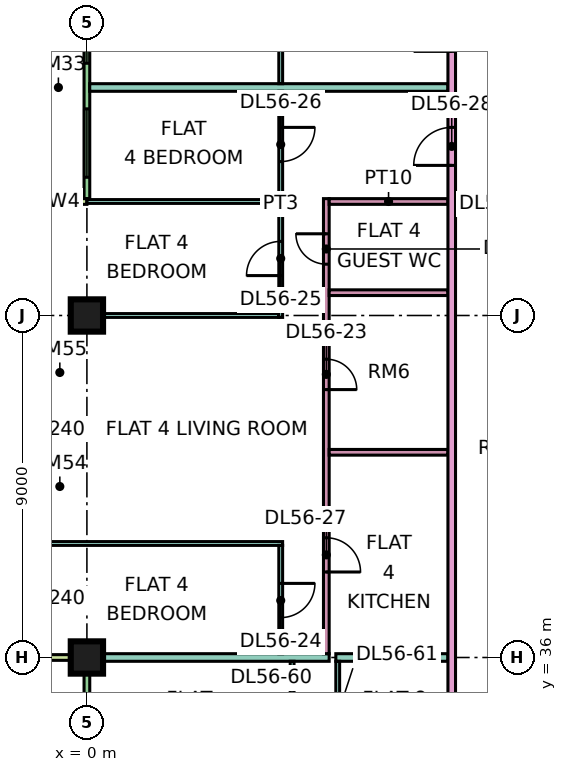
"""IFC4 building model, lengths in metres.
Left out: names, types, materials, properties, quantities, classifications, styles, units other than length and angle.
Written with IfcOpenShell. Run it as: python <this file> out.ifc"""

import sys

from ifc_helpers import new_model, si_unit, direction, frame, frame_2d, origin, origin_2d, place, context, subcontext, project, spatial, rectangle, extrude, element, fill, save


model = new_model("IFC4")
c1 = context("Model", 3, precision=1e-05, world=origin(), true_north=direction((0.0, 1.0)))
c2 = subcontext(c1, "Body", "Model", "MODEL_VIEW")
j1 = project(units=[si_unit("LENGTHUNIT", "METRE"), si_unit("PLANEANGLEUNIT", "RADIAN")], contexts=[c1])
p1 = place(None, origin())
s1 = spatial("IfcSite", under=j1, at=p1, CompositionType="ELEMENT")
p2 = place(p1, origin())
s2 = spatial("IfcBuilding", under=s1, at=p2, CompositionType="ELEMENT")
p3 = place(p2, frame((0.0, 0.0, 237.9)))
s3 = spatial("IfcBuildingStorey", under=s2, at=p3, CompositionType="ELEMENT", Elevation=237.9)
p4 = place(p3, frame((0.0, 36.0, 0.0), z_axis=(0.0, 0.0, 1.0), x_axis=(1.0, 0.0, 0.0)))
e1 = element("IfcColumn", 1, at=p4, inside=s3, PredefinedType="COLUMN", context=c2, shape_type="SweptSolid", body=[
    extrude(rectangle(XDim=0.85, YDim=0.85, at=origin_2d()), origin(), (0.0, 0.0, 1.0), 3.75),
])
p5 = place(p3, frame((0.0, 45.0, 0.0), z_axis=(0.0, 0.0, 1.0), x_axis=(1.0, 0.0, 0.0)))
e2 = element("IfcColumn", 2, at=p5, inside=s3, PredefinedType="COLUMN", context=c2, shape_type="SweptSolid", body=[
    extrude(rectangle(XDim=0.85, YDim=0.85, at=origin_2d()), origin(), (0.0, 0.0, 1.0), 3.75),
])
p6 = place(p3, frame((0.0, 61.425, 0.0), z_axis=(0.0, 0.0, 1.0), x_axis=(0.0, -1.0, 0.0)))
e3 = element("IfcWall", 3, at=p6, inside=s3, PredefinedType="SOLIDWALL", context=c2, shape_type="SweptSolid", body=[
    extrude(rectangle(XDim=13.35, YDim=0.15, at=frame_2d((6.675, 0.0))), origin(), (0.0, 0.0, 1.0), 3.35),
])
p7 = place(p6, frame((1.312, 0.0, 0.0)))
e4 = element("IfcOpeningElement", 4, at=p7, cuts=e3, PredefinedType="OPENING", context=c2, shape_type="SweptSolid", body=[
    extrude(rectangle(XDim=1.8, YDim=2.4, at=frame_2d((0.9, 1.2))), frame((0.0, 0.085, 0.0), z_axis=(0.0, -1.0, 0.0), x_axis=(1.0, 0.0, 0.0)), (0.0, 0.0, 1.0), 0.17),
])
p8 = place(p6, frame((5.062, 0.0, 0.45)))
e5 = element("IfcOpeningElement", 5, at=p8, cuts=e3, PredefinedType="OPENING", context=c2, shape_type="SweptSolid", body=[
    extrude(rectangle(XDim=1.2, YDim=2.4, at=frame_2d((0.6, 1.2))), frame((0.0, 0.085, 0.0), z_axis=(0.0, -1.0, 0.0), x_axis=(1.0, 0.0, 0.0)), (0.0, 0.0, 1.0), 0.17),
])
p9 = place(p6, frame((8.587, 0.0, 0.45)))
e6 = element("IfcOpeningElement", 6, at=p9, cuts=e3, PredefinedType="OPENING", context=c2, shape_type="SweptSolid", body=[
    extrude(rectangle(XDim=1.2, YDim=2.4, at=frame_2d((0.6, 1.2))), frame((0.0, 0.085, 0.0), z_axis=(0.0, -1.0, 0.0), x_axis=(1.0, 0.0, 0.0)), (0.0, 0.0, 1.0), 0.17),
])
p10 = place(p6, frame((10.988, 0.0, 0.45)))
e7 = element("IfcOpeningElement", 7, at=p10, cuts=e3, PredefinedType="OPENING", context=c2, shape_type="SweptSolid", body=[
    extrude(rectangle(XDim=1.8, YDim=2.4, at=frame_2d((0.9, 1.2))), frame((0.0, 0.085, 0.0), z_axis=(0.0, -1.0, 0.0), x_axis=(1.0, 0.0, 0.0)), (0.0, 0.0, 1.0), 0.17),
])
p11 = place(p3, frame((-1.5, 48.0, 0.0), z_axis=(0.0, 0.0, 1.0), x_axis=(1.0, 0.0, 0.0)))
e8 = element("IfcWall", 8, at=p11, inside=s3, PredefinedType="SOLIDWALL", context=c2, shape_type="SweptSolid", body=[
    extrude(rectangle(XDim=1.5, YDim=0.15, at=frame_2d((0.75, 0.0))), origin(), (0.0, 0.0, 1.0), 3.35),
])
p12 = place(p3, frame((0.0, 35.925, 0.0), z_axis=(0.0, 0.0, 1.0), x_axis=(0.0, -1.0, 0.0)))
e9 = element("IfcWall", 9, at=p12, inside=s3, PredefinedType="SOLIDWALL", context=c2, shape_type="SweptSolid", body=[
    extrude(rectangle(XDim=11.85, YDim=0.15, at=frame_2d((5.925, 0.0))), origin(), (0.0, 0.0, 1.0), 3.35),
])
p13 = place(p12, frame((1.087, 0.0, 0.0)))
e10 = element("IfcOpeningElement", 10, at=p13, cuts=e9, PredefinedType="OPENING", context=c2, shape_type="SweptSolid", body=[
    extrude(rectangle(XDim=1.2, YDim=2.4, at=frame_2d((0.6, 1.2))), frame((0.0, 0.085, 0.0), z_axis=(0.0, -1.0, 0.0), x_axis=(1.0, 0.0, 0.0)), (0.0, 0.0, 1.0), 0.17),
])
p14 = place(p12, frame((3.525, 0.0, 0.45)))
e11 = element("IfcOpeningElement", 11, at=p14, cuts=e9, PredefinedType="OPENING", context=c2, shape_type="SweptSolid", body=[
    extrude(rectangle(XDim=1.8, YDim=2.4, at=frame_2d((0.9, 1.2))), frame((0.0, 0.085, 0.0), z_axis=(0.0, -1.0, 0.0), x_axis=(1.0, 0.0, 0.0)), (0.0, 0.0, 1.0), 0.17),
])
p15 = place(p12, frame((7.163, 0.0, 0.45)))
e12 = element("IfcOpeningElement", 12, at=p15, cuts=e9, PredefinedType="OPENING", context=c2, shape_type="SweptSolid", body=[
    extrude(rectangle(XDim=3.0, YDim=2.4, at=frame_2d((1.5, 1.2))), frame((0.0, 0.085, 0.0), z_axis=(0.0, -1.0, 0.0), x_axis=(1.0, 0.0, 0.0)), (0.0, 0.0, 1.0), 0.17),
])
p16 = place(p3, frame((-1.5, 36.0, 0.0), z_axis=(0.0, 0.0, 1.0), x_axis=(1.0, 0.0, 0.0)))
e13 = element("IfcWall", 13, at=p16, inside=s3, PredefinedType="SOLIDWALL", context=c2, shape_type="SweptSolid", body=[
    extrude(rectangle(XDim=1.5, YDim=0.15, at=frame_2d((0.75, 0.0))), origin(), (0.0, 0.0, 1.0), 3.35),
])
e14 = element("IfcWall", 14, at=p4, inside=s3, PredefinedType="PARTITIONING", context=c2, shape_type="SweptSolid", body=[
    extrude(rectangle(XDim=6.375, YDim=0.2, at=frame_2d((3.188, 0.0))), origin(), (0.0, 0.0, 1.0), 3.35),
])
p17 = place(p3, frame((-1.35, 39.0, 0.0), z_axis=(0.0, 0.0, 1.0), x_axis=(1.0, 0.0, 0.0)))
e15 = element("IfcWall", 15, at=p17, inside=s3, PredefinedType="PARTITIONING", context=c2, shape_type="SweptSolid", body=[
    extrude(rectangle(XDim=6.5, YDim=0.1, at=frame_2d((3.25, 0.0))), origin(), (0.0, 0.0, 1.0), 3.35),
])
e16 = element("IfcWall", 16, at=p5, inside=s3, PredefinedType="PARTITIONING", context=c2, shape_type="SweptSolid", body=[
    extrude(rectangle(XDim=5.05, YDim=0.1, at=frame_2d((2.525, 0.0))), origin(), (0.0, 0.0, 1.0), 3.35),
])
p18 = place(p3, frame((0.0, 48.0, 0.0), z_axis=(0.0, 0.0, 1.0), x_axis=(1.0, 0.0, 0.0)))
e17 = element("IfcWall", 17, at=p18, inside=s3, PredefinedType="PARTITIONING", context=c2, shape_type="SweptSolid", body=[
    extrude(rectangle(XDim=5.05, YDim=0.1, at=frame_2d((2.525, 0.0))), origin(), (0.0, 0.0, 1.0), 3.35),
])
p19 = place(p3, frame((0.074, 51.0, 0.0), z_axis=(0.0, 0.0, 1.0), x_axis=(1.0, 0.0, 0.0)))
e18 = element("IfcWall", 18, at=p19, inside=s3, PredefinedType="PARTITIONING", context=c2, shape_type="SweptSolid", body=[
    extrude(rectangle(XDim=9.426, YDim=0.2, at=frame_2d((4.713, 0.0))), origin(), (0.0, 0.0, 1.0), 3.35),
])
p20 = place(p3, frame((5.1, 36.1, 0.0), z_axis=(0.0, 0.0, 1.0), x_axis=(0.0, 1.0, 0.0)))
e19 = element("IfcWall", 19, at=p20, inside=s3, PredefinedType="PARTITIONING", context=c2, shape_type="SweptSolid", body=[
    extrude(rectangle(XDim=2.85, YDim=0.1, at=frame_2d((1.425, 0.0))), origin(), (0.0, 0.0, 1.0), 3.35),
])
p21 = place(p20, frame((0.95, 0.0, 0.0)))
e20 = element("IfcOpeningElement", 20, at=p21, cuts=e19, PredefinedType="OPENING", context=c2, shape_type="SweptSolid", body=[
    extrude(rectangle(XDim=0.9, YDim=2.1, at=frame_2d((0.45, 1.05))), frame((0.0, 0.06, 0.0), z_axis=(0.0, -1.0, 0.0), x_axis=(1.0, 0.0, 0.0)), (0.0, 0.0, 1.0), 0.12),
])
p22 = place(p3, frame((5.1, 44.95, 0.0), z_axis=(0.0, 0.0, 1.0), x_axis=(0.0, 1.0, 0.0)))
e21 = element("IfcWall", 21, at=p22, inside=s3, PredefinedType="PARTITIONING", context=c2, shape_type="SweptSolid", body=[
    extrude(rectangle(XDim=5.95, YDim=0.1, at=frame_2d((2.975, 0.0))), origin(), (0.0, 0.0, 1.0), 3.35),
])
p23 = place(p22, frame((1.1, 0.0, 0.0)))
e22 = element("IfcOpeningElement", 22, at=p23, cuts=e21, PredefinedType="OPENING", context=c2, shape_type="SweptSolid", body=[
    extrude(rectangle(XDim=0.9, YDim=2.1, at=frame_2d((0.45, 1.05))), frame((0.0, 0.06, 0.0), z_axis=(0.0, -1.0, 0.0), x_axis=(1.0, 0.0, 0.0)), (0.0, 0.0, 1.0), 0.12),
])
p24 = place(p22, frame((4.1, 0.0, 0.0)))
e23 = element("IfcOpeningElement", 23, at=p24, cuts=e21, PredefinedType="OPENING", context=c2, shape_type="SweptSolid", body=[
    extrude(rectangle(XDim=0.9, YDim=2.1, at=frame_2d((0.45, 1.05))), frame((0.0, 0.06, 0.0), z_axis=(0.0, -1.0, 0.0), x_axis=(1.0, 0.0, 0.0)), (0.0, 0.0, 1.0), 0.12),
])
p25 = place(p3, frame((5.1, 51.1, 0.0), z_axis=(0.0, 0.0, 1.0), x_axis=(0.0, 1.0, 0.0)))
e24 = element("IfcWall", 24, at=p25, inside=s3, PredefinedType="PARTITIONING", context=c2, shape_type="SweptSolid", body=[
    extrude(rectangle(XDim=5.95, YDim=0.1, at=frame_2d((2.975, 0.0))), origin(), (0.0, 0.0, 1.0), 3.35),
])
p26 = place(p25, frame((0.95, 0.0, 0.0)))
e25 = element("IfcOpeningElement", 25, at=p26, cuts=e24, PredefinedType="OPENING", context=c2, shape_type="SweptSolid", body=[
    extrude(rectangle(XDim=0.9, YDim=2.1, at=frame_2d((0.45, 1.05))), frame((0.0, 0.06, 0.0), z_axis=(0.0, -1.0, 0.0), x_axis=(1.0, 0.0, 0.0)), (0.0, 0.0, 1.0), 0.12),
])
p27 = place(p25, frame((3.95, 0.0, 0.0)))
e26 = element("IfcOpeningElement", 26, at=p27, cuts=e24, PredefinedType="OPENING", context=c2, shape_type="SweptSolid", body=[
    extrude(rectangle(XDim=0.9, YDim=2.1, at=frame_2d((0.45, 1.05))), frame((0.0, 0.06, 0.0), z_axis=(0.0, -1.0, 0.0), x_axis=(1.0, 0.0, 0.0)), (0.0, 0.0, 1.0), 0.12),
])
p28 = place(p3, frame((5.4, 29.95, 0.0), z_axis=(0.0, 0.0, 1.0), x_axis=(0.0, 1.0, 0.0)))
e27 = element("IfcWall", 27, at=p28, inside=s3, PredefinedType="PARTITIONING", context=c2, shape_type="SweptSolid", body=[
    extrude(rectangle(XDim=5.95, YDim=0.1, at=frame_2d((2.975, 0.0))), origin(), (0.0, 0.0, 1.0), 3.35),
])
p29 = place(p28, frame((1.1, 0.0, 0.0)))
e28 = element("IfcOpeningElement", 28, at=p29, cuts=e27, PredefinedType="OPENING", context=c2, shape_type="SweptSolid", body=[
    extrude(rectangle(XDim=0.9, YDim=2.1, at=frame_2d((0.45, 1.05))), frame((0.0, 0.06, 0.0), z_axis=(0.0, -1.0, 0.0), x_axis=(1.0, 0.0, 0.0)), (0.0, 0.0, 1.0), 0.12),
])
p30 = place(p28, frame((4.1, 0.0, 0.0)))
e29 = element("IfcOpeningElement", 29, at=p30, cuts=e27, PredefinedType="OPENING", context=c2, shape_type="SweptSolid", body=[
    extrude(rectangle(XDim=0.9, YDim=2.1, at=frame_2d((0.45, 1.05))), frame((0.0, 0.06, 0.0), z_axis=(0.0, -1.0, 0.0), x_axis=(1.0, 0.0, 0.0)), (0.0, 0.0, 1.0), 0.12),
])
p31 = place(p3, frame((6.3, 36.1, 0.0), z_axis=(0.0, 0.0, 1.0), x_axis=(0.0, 1.0, 0.0)))
e30 = element("IfcWall", 30, at=p31, inside=s3, PredefinedType="PARTITIONING", context=c2, shape_type="SweptSolid", body=[
    extrude(rectangle(XDim=11.975, YDim=0.15, at=frame_2d((5.987, 0.0))), origin(), (0.0, 0.0, 1.0), 3.35),
])
p32 = place(p31, frame((6.95, 0.0, 0.0)))
e31 = element("IfcOpeningElement", 31, at=p32, cuts=e30, PredefinedType="OPENING", context=c2, shape_type="SweptSolid", body=[
    extrude(rectangle(XDim=0.8, YDim=2.1, at=frame_2d((0.4, 1.05))), frame((0.0, 0.085, 0.0), z_axis=(0.0, -1.0, 0.0), x_axis=(1.0, 0.0, 0.0)), (0.0, 0.0, 1.0), 0.17),
])
p33 = place(p31, frame((2.15, 0.0, 0.0)))
e32 = element("IfcOpeningElement", 32, at=p33, cuts=e30, PredefinedType="OPENING", context=c2, shape_type="SweptSolid", body=[
    extrude(rectangle(XDim=0.9, YDim=2.1, at=frame_2d((0.45, 1.05))), frame((0.0, 0.085, 0.0), z_axis=(0.0, -1.0, 0.0), x_axis=(1.0, 0.0, 0.0)), (0.0, 0.0, 1.0), 0.17),
])
p34 = place(p31, frame((10.25, 0.0, 0.0)))
e33 = element("IfcOpeningElement", 33, at=p34, cuts=e30, PredefinedType="OPENING", context=c2, shape_type="SweptSolid", body=[
    extrude(rectangle(XDim=0.8, YDim=2.1, at=frame_2d((0.4, 1.05))), frame((0.0, 0.085, 0.0), z_axis=(0.0, -1.0, 0.0), x_axis=(1.0, 0.0, 0.0)), (0.0, 0.0, 1.0), 0.17),
])
for number, where, z_axis, x_axis in (
    (34, (6.375, 41.4, 0.0), (0.0, 0.0, 1.0), (1.0, 0.0, 0.0)),
    (35, (6.375, 45.6, 0.0), (0.0, 0.0, 1.0), (1.0, 0.0, 0.0)),
    (36, (6.375, 48.0, 0.0), (0.0, 0.0, 1.0), (1.0, 0.0, 0.0)),
):
    element("IfcWall", number, at=place(p3, frame(where, z_axis=z_axis, x_axis=x_axis)), inside=s3, PredefinedType="PARTITIONING", context=c2, shape_type="SweptSolid", body=[
        extrude(rectangle(XDim=3.125, YDim=0.15, at=frame_2d((1.562, 0.0))), origin(), (0.0, 0.0, 1.0), 3.35),
    ])
p35 = place(p3, frame((6.55, 36.0, 0.0), z_axis=(0.0, 0.0, 1.0), x_axis=(1.0, 0.0, 0.0)))
e37 = element("IfcWall", 37, at=p35, inside=s3, PredefinedType="PARTITIONING", context=c2, shape_type="SweptSolid", body=[
    extrude(rectangle(XDim=2.95, YDim=0.2, at=frame_2d((1.475, 0.0))), origin(), (0.0, 0.0, 1.0), 3.35),
])
p36 = place(p3, frame((6.6, 32.95, 0.0), z_axis=(0.0, 0.0, 1.0), x_axis=(0.0, 1.0, 0.0)))
e38 = element("IfcWall", 38, at=p36, inside=s3, PredefinedType="PARTITIONING", context=c2, shape_type="SweptSolid", body=[
    extrude(rectangle(XDim=2.95, YDim=0.1, at=frame_2d((1.475, 0.0))), origin(), (0.0, 0.0, 1.0), 3.35),
])
p37 = place(p36, frame((1.1, 0.0, 0.0)))
e39 = element("IfcOpeningElement", 39, at=p37, cuts=e38, PredefinedType="OPENING", context=c2, shape_type="SweptSolid", body=[
    extrude(rectangle(XDim=0.9, YDim=2.1, at=frame_2d((0.45, 1.05))), frame((0.0, 0.06, 0.0), z_axis=(0.0, -1.0, 0.0), x_axis=(1.0, 0.0, 0.0)), (0.0, 0.0, 1.0), 0.12),
])
p38 = place(p3, frame((9.6, 20.0, 0.0), z_axis=(0.0, 0.0, 1.0), x_axis=(0.0, 1.0, 0.0)))
e40 = element("IfcWall", 40, at=p38, inside=s3, PredefinedType="PARTITIONING", context=c2, shape_type="SweptSolid", body=[
    extrude(rectangle(XDim=42.926, YDim=0.2, at=frame_2d((21.463, 0.0))), origin(), (0.0, 0.0, 1.0), 3.35),
])
p39 = place(p38, frame((28.95, 0.0, 0.0)))
e41 = element("IfcOpeningElement", 41, at=p39, cuts=e40, PredefinedType="OPENING", context=c2, shape_type="SweptSolid", body=[
    extrude(rectangle(XDim=1.0, YDim=2.1, at=frame_2d((0.5, 1.05))), frame((0.0, 0.11, 0.0), z_axis=(0.0, -1.0, 0.0), x_axis=(1.0, 0.0, 0.0)), (0.0, 0.0, 1.0), 0.22),
])
p40 = place(p38, frame((31.95, 0.0, 0.0)))
e42 = element("IfcOpeningElement", 42, at=p40, cuts=e40, PredefinedType="OPENING", context=c2, shape_type="SweptSolid", body=[
    extrude(rectangle(XDim=1.0, YDim=2.1, at=frame_2d((0.5, 1.05))), frame((0.0, 0.11, 0.0), z_axis=(0.0, -1.0, 0.0), x_axis=(1.0, 0.0, 0.0)), (0.0, 0.0, 1.0), 0.22),
])
p41 = place(p38, frame((0.6, 0.0, 0.0)))
e43 = element("IfcOpeningElement", 43, at=p41, cuts=e40, PredefinedType="OPENING", context=c2, shape_type="SweptSolid", body=[
    extrude(rectangle(XDim=1.2, YDim=2.1, at=frame_2d((0.6, 1.05))), frame((0.0, 0.11, 0.0), z_axis=(0.0, -1.0, 0.0), x_axis=(1.0, 0.0, 0.0)), (0.0, 0.0, 1.0), 0.22),
])
p42 = place(p38, frame((11.25, 0.0, 0.0)))
e44 = element("IfcOpeningElement", 44, at=p42, cuts=e40, PredefinedType="OPENING", context=c2, shape_type="SweptSolid", body=[
    extrude(rectangle(XDim=1.0, YDim=2.1, at=frame_2d((0.5, 1.05))), frame((0.0, 0.11, 0.0), z_axis=(0.0, -1.0, 0.0), x_axis=(1.0, 0.0, 0.0)), (0.0, 0.0, 1.0), 0.22),
])
p43 = place(p9, origin())
e45 = element("IfcWindow", 45, at=p43, inside=s3, PartitioningType="SINGLE_PANEL", PredefinedType="WINDOW", context=c2, shape_type="SweptSolid", body=[
    extrude(rectangle(XDim=1.2, YDim=2.4, at=frame_2d((0.6, 1.2))), frame((0.0, 0.03, 0.0), z_axis=(0.0, -1.0, 0.0), x_axis=(1.0, 0.0, 0.0)), (0.0, 0.0, 1.0), 0.06),
])
fill(e6, e45)
p44 = place(p10, origin())
e46 = element("IfcWindow", 46, at=p44, inside=s3, PartitioningType="SINGLE_PANEL", PredefinedType="WINDOW", context=c2, shape_type="SweptSolid", body=[
    extrude(rectangle(XDim=1.8, YDim=2.4, at=frame_2d((0.9, 1.2))), frame((0.0, 0.03, 0.0), z_axis=(0.0, -1.0, 0.0), x_axis=(1.0, 0.0, 0.0)), (0.0, 0.0, 1.0), 0.06),
])
fill(e7, e46)
p45 = place(p32, frame((0.8, 0.0, 0.0), z_axis=(0.0, 0.0, 1.0), x_axis=(-1.0, 0.0, 0.0)))
e47 = element("IfcDoor", 47, at=p45, inside=s3, OperationType="SINGLE_SWING_LEFT", PredefinedType="DOOR", context=c2, shape_type="SweptSolid", body=[
    extrude(rectangle(XDim=0.8, YDim=2.1, at=frame_2d((0.4, 1.05))), frame((0.0, 0.025, 0.0), z_axis=(0.0, -1.0, 0.0), x_axis=(1.0, 0.0, 0.0)), (0.0, 0.0, 1.0), 0.05),
])
fill(e31, e47)
p46 = place(p21, origin())
e48 = element("IfcDoor", 48, at=p46, inside=s3, OperationType="SINGLE_SWING_RIGHT", PredefinedType="DOOR", context=c2, shape_type="SweptSolid", body=[
    extrude(rectangle(XDim=0.9, YDim=2.1, at=frame_2d((0.45, 1.05))), frame((0.0, 0.025, 0.0), z_axis=(0.0, -1.0, 0.0), x_axis=(1.0, 0.0, 0.0)), (0.0, 0.0, 1.0), 0.05),
])
fill(e20, e48)
p47 = place(p23, origin())
e49 = element("IfcDoor", 49, at=p47, inside=s3, OperationType="SINGLE_SWING_LEFT", PredefinedType="DOOR", context=c2, shape_type="SweptSolid", body=[
    extrude(rectangle(XDim=0.9, YDim=2.1, at=frame_2d((0.45, 1.05))), frame((0.0, 0.025, 0.0), z_axis=(0.0, -1.0, 0.0), x_axis=(1.0, 0.0, 0.0)), (0.0, 0.0, 1.0), 0.05),
])
fill(e22, e49)
p48 = place(p24, origin())
e50 = element("IfcDoor", 50, at=p48, inside=s3, OperationType="SINGLE_SWING_RIGHT", PredefinedType="DOOR", context=c2, shape_type="SweptSolid", body=[
    extrude(rectangle(XDim=0.9, YDim=2.1, at=frame_2d((0.45, 1.05))), frame((0.0, 0.025, 0.0), z_axis=(0.0, -1.0, 0.0), x_axis=(1.0, 0.0, 0.0)), (0.0, 0.0, 1.0), 0.05),
])
fill(e23, e50)
p49 = place(p33, frame((0.9, 0.0, 0.0), z_axis=(0.0, 0.0, 1.0), x_axis=(-1.0, 0.0, 0.0)))
e51 = element("IfcDoor", 51, at=p49, inside=s3, OperationType="SINGLE_SWING_LEFT", PredefinedType="DOOR", context=c2, shape_type="SweptSolid", body=[
    extrude(rectangle(XDim=0.9, YDim=2.1, at=frame_2d((0.45, 1.05))), frame((0.0, 0.025, 0.0), z_axis=(0.0, -1.0, 0.0), x_axis=(1.0, 0.0, 0.0)), (0.0, 0.0, 1.0), 0.05),
])
fill(e32, e51)
p50 = place(p39, origin())
e52 = element("IfcDoor", 52, at=p50, inside=s3, OperationType="SINGLE_SWING_LEFT", PredefinedType="DOOR", context=c2, shape_type="SweptSolid", body=[
    extrude(rectangle(XDim=1.0, YDim=2.1, at=frame_2d((0.5, 1.05))), frame((0.0, 0.025, 0.0), z_axis=(0.0, -1.0, 0.0), x_axis=(1.0, 0.0, 0.0)), (0.0, 0.0, 1.0), 0.05),
])
fill(e41, e52)
p51 = place(p34, frame((0.8, 0.0, 0.0), z_axis=(0.0, 0.0, 1.0), x_axis=(-1.0, 0.0, 0.0)))
e53 = element("IfcDoor", 53, at=p51, inside=s3, OperationType="SINGLE_SWING_RIGHT", PredefinedType="DOOR", context=c2, shape_type="SweptSolid", body=[
    extrude(rectangle(XDim=0.8, YDim=2.1, at=frame_2d((0.4, 1.05))), frame((0.0, 0.025, 0.0), z_axis=(0.0, -1.0, 0.0), x_axis=(1.0, 0.0, 0.0)), (0.0, 0.0, 1.0), 0.05),
])
fill(e33, e53)
save(model, sys.argv[1])
